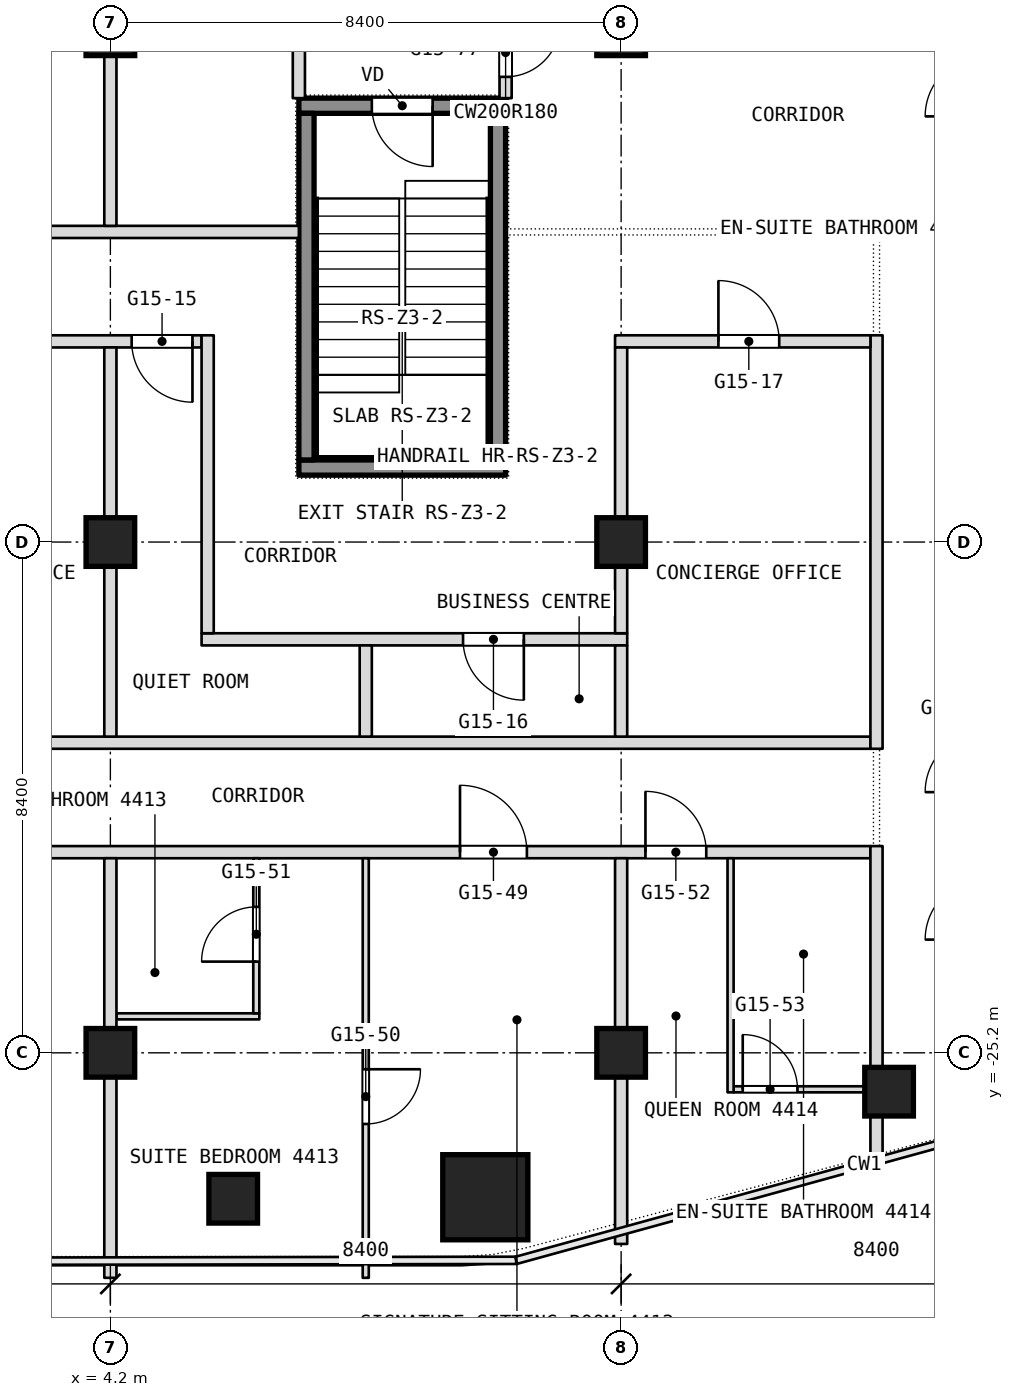
"""IFC4 building model, lengths in metres.
Left out: names, types, materials, properties, quantities, classifications, styles, units other than length and angle.
Written with IfcOpenShell. Run it as: python <this file> out.ifc"""

import sys

from ifc_helpers import new_model, si_unit, direction, frame, frame_2d, origin, origin_2d, place, context, subcontext, project, spatial, rectangle, extrude, element, fill, save


model = new_model("IFC4")
c1 = context("Model", 3, precision=1e-05, world=origin(), true_north=direction((0.0, 1.0)))
c2 = subcontext(c1, "Body", "Model", "MODEL_VIEW")
j1 = project(units=[si_unit("LENGTHUNIT", "METRE"), si_unit("PLANEANGLEUNIT", "RADIAN")], contexts=[c1])
p1 = place(None, origin())
s1 = spatial("IfcSite", under=j1, at=p1, CompositionType="ELEMENT")
p2 = place(p1, origin())
s2 = spatial("IfcBuilding", under=s1, at=p2, CompositionType="ELEMENT")
p3 = place(p2, frame((0.0, 0.0, 194.9)))
s3 = spatial("IfcBuildingStorey", under=s2, at=p3, CompositionType="ELEMENT", Elevation=194.9)
p4 = place(p3, frame((10.366, -27.575, 0.0), z_axis=(0.0, 0.0, 1.0), x_axis=(1.0, 0.0, 0.0)))
e1 = element("IfcColumn", 1, at=p4, inside=s3, PredefinedType="COLUMN", context=c2, shape_type="SweptSolid", body=[
    extrude(rectangle(XDim=1.4, YDim=1.4, at=origin_2d()), origin(), (0.0, 0.0, 1.0), 3.6),
])
for number, where, z_axis, x_axis in (
    (2, (4.2, -25.2, 0.0), (0.0, 0.0, 1.0), (1.0, 0.0, 0.0)),
    (3, (4.2, -16.8, 0.0), (0.0, 0.0, 1.0), (1.0, 0.0, 0.0)),
    (4, (4.2, -8.4, 0.0), (0.0, 0.0, 1.0), (1.0, 0.0, 0.0)),
    (5, (12.6, -25.2, 0.0), (0.0, 0.0, 1.0), (1.0, 0.0, 0.0)),
    (6, (12.6, -16.8, 0.0), (0.0, 0.0, 1.0), (1.0, 0.0, 0.0)),
    (7, (12.6, -8.4, 0.0), (0.0, 0.0, 1.0), (1.0, 0.0, 0.0)),
    (8, (17.007, -25.839, 0.0), (0.0, 0.0, 1.0), (1.0, 0.0, 0.0)),
    (9, (6.22, -27.6, 0.0), (0.0, 0.0, 1.0), (1.0, 0.0, 0.0)),
):
    element("IfcColumn", number, at=place(p3, frame(where, z_axis=z_axis, x_axis=x_axis)), inside=s3, PredefinedType="COLUMN", context=c2, shape_type="SweptSolid", body=[
        extrude(rectangle(XDim=0.8, YDim=0.8, at=origin_2d()), origin(), (0.0, 0.0, 1.0), 3.6),
    ])
p5 = place(p3, frame((14.45, -25.8, 0.0), z_axis=(0.0, 0.0, 1.0), x_axis=(1.0, 0.0, 0.0)))
e10 = element("IfcWall", 10, at=p5, inside=s3, PredefinedType="PARTITIONING", context=c2, shape_type="SweptSolid", body=[
    extrude(rectangle(XDim=2.25, YDim=0.1, at=frame_2d((1.125, 0.0))), origin(), (0.0, 0.0, 1.0), 3.34),
])
p6 = place(p5, frame((0.15, 0.0, 0.0)))
e11 = element("IfcOpeningElement", 11, at=p6, cuts=e10, PredefinedType="OPENING", context=c2, shape_type="SweptSolid", body=[
    extrude(rectangle(XDim=0.9, YDim=2.1, at=frame_2d((0.45, 1.05))), frame((0.0, 0.05, 0.0), z_axis=(0.0, -1.0, 0.0), x_axis=(1.0, 0.0, 0.0)), (0.0, 0.0, 1.0), 0.1),
])
p7 = place(p3, frame((4.3, -24.6, 0.0), z_axis=(0.0, 0.0, 1.0), x_axis=(1.0, 0.0, 0.0)))
e12 = element("IfcWall", 12, at=p7, inside=s3, PredefinedType="PARTITIONING", context=c2, shape_type="SweptSolid", body=[
    extrude(rectangle(XDim=2.35, YDim=0.1, at=frame_2d((1.175, 0.0))), origin(), (0.0, 0.0, 1.0), 3.34),
])
p8 = place(p3, frame((-16.7, -21.9, 0.0), z_axis=(0.0, 0.0, 1.0), x_axis=(1.0, 0.0, 0.0)))
e13 = element("IfcWall", 13, at=p8, inside=s3, PredefinedType="PARTITIONING", context=c2, shape_type="SweptSolid", body=[
    extrude(rectangle(XDim=33.4, YDim=0.2, at=frame_2d((16.7, 0.0))), origin(), (0.0, 0.0, 1.0), 3.34),
])
p9 = place(p8, frame((0.3, 0.0, 0.0)))
e14 = element("IfcOpeningElement", 14, at=p9, cuts=e13, PredefinedType="OPENING", context=c2, shape_type="SweptSolid", body=[
    extrude(rectangle(XDim=1.0, YDim=2.1, at=frame_2d((0.5, 1.05))), frame((0.0, 0.1, 0.0), z_axis=(0.0, -1.0, 0.0), x_axis=(1.0, 0.0, 0.0)), (0.0, 0.0, 1.0), 0.2),
])
p10 = place(p8, frame((6.9, 0.0, 0.0)))
e15 = element("IfcOpeningElement", 15, at=p10, cuts=e13, PredefinedType="OPENING", context=c2, shape_type="SweptSolid", body=[
    extrude(rectangle(XDim=1.0, YDim=2.1, at=frame_2d((0.5, 1.05))), frame((0.0, 0.1, 0.0), z_axis=(0.0, -1.0, 0.0), x_axis=(1.0, 0.0, 0.0)), (0.0, 0.0, 1.0), 0.2),
])
p11 = place(p8, frame((8.7, 0.0, 0.0)))
e16 = element("IfcOpeningElement", 16, at=p11, cuts=e13, PredefinedType="OPENING", context=c2, shape_type="SweptSolid", body=[
    extrude(rectangle(XDim=1.0, YDim=2.1, at=frame_2d((0.5, 1.05))), frame((0.0, 0.1, 0.0), z_axis=(0.0, -1.0, 0.0), x_axis=(1.0, 0.0, 0.0)), (0.0, 0.0, 1.0), 0.2),
])
p12 = place(p8, frame((15.8, 0.0, 0.0)))
e17 = element("IfcOpeningElement", 17, at=p12, cuts=e13, PredefinedType="OPENING", context=c2, shape_type="SweptSolid", body=[
    extrude(rectangle(XDim=1.8, YDim=2.1, at=frame_2d((0.9, 1.05))), frame((0.0, 0.1, 0.0), z_axis=(0.0, -1.0, 0.0), x_axis=(1.0, 0.0, 0.0)), (0.0, 0.0, 1.0), 0.2),
])
p13 = place(p8, frame((26.65, 0.0, 0.0)))
e18 = element("IfcOpeningElement", 18, at=p13, cuts=e13, PredefinedType="OPENING", context=c2, shape_type="SweptSolid", body=[
    extrude(rectangle(XDim=1.1, YDim=2.1, at=frame_2d((0.55, 1.05))), frame((0.0, 0.1, 0.0), z_axis=(0.0, -1.0, 0.0), x_axis=(1.0, 0.0, 0.0)), (0.0, 0.0, 1.0), 0.2),
])
p14 = place(p8, frame((29.7, 0.0, 0.0)))
e19 = element("IfcOpeningElement", 19, at=p14, cuts=e13, PredefinedType="OPENING", context=c2, shape_type="SweptSolid", body=[
    extrude(rectangle(XDim=1.0, YDim=2.1, at=frame_2d((0.5, 1.05))), frame((0.0, 0.1, 0.0), z_axis=(0.0, -1.0, 0.0), x_axis=(1.0, 0.0, 0.0)), (0.0, 0.0, 1.0), 0.2),
])
p15 = place(p3, frame((-16.7, -20.1, 0.0), z_axis=(0.0, 0.0, 1.0), x_axis=(1.0, 0.0, 0.0)))
e20 = element("IfcWall", 20, at=p15, inside=s3, PredefinedType="PARTITIONING", context=c2, shape_type="SweptSolid", body=[
    extrude(rectangle(XDim=33.4, YDim=0.2, at=frame_2d((16.7, 0.0))), origin(), (0.0, 0.0, 1.0), 3.34),
])
p16 = place(p3, frame((5.7, -18.4, 0.0), z_axis=(0.0, 0.0, 1.0), x_axis=(1.0, 0.0, 0.0)))
e21 = element("IfcWall", 21, at=p16, inside=s3, PredefinedType="PARTITIONING", context=c2, shape_type="SweptSolid", body=[
    extrude(rectangle(XDim=7.0, YDim=0.2, at=frame_2d((3.5, 0.0))), origin(), (0.0, 0.0, 1.0), 3.34),
])
p17 = place(p16, frame((4.3, 0.0, 0.0)))
e22 = element("IfcOpeningElement", 22, at=p17, cuts=e21, PredefinedType="OPENING", context=c2, shape_type="SweptSolid", body=[
    extrude(rectangle(XDim=1.0, YDim=2.1, at=frame_2d((0.5, 1.05))), frame((0.0, 0.1, 0.0), z_axis=(0.0, -1.0, 0.0), x_axis=(1.0, 0.0, 0.0)), (0.0, 0.0, 1.0), 0.2),
])
p18 = place(p3, frame((16.8, -27.229, 0.0), z_axis=(0.0, 0.0, 1.0), x_axis=(0.0, 1.0, 0.0)))
e23 = element("IfcWall", 23, at=p18, inside=s3, PredefinedType="PARTITIONING", context=c2, shape_type="SweptSolid", body=[
    extrude(rectangle(XDim=5.429, YDim=0.2, at=frame_2d((2.714, 0.0))), origin(), (0.0, 0.0, 1.0), 3.34),
])
p19 = place(p3, frame((16.8, -20.2, 0.0), z_axis=(0.0, 0.0, 1.0), x_axis=(0.0, 1.0, 0.0)))
e24 = element("IfcWall", 24, at=p19, inside=s3, PredefinedType="PARTITIONING", context=c2, shape_type="SweptSolid", body=[
    extrude(rectangle(XDim=6.8, YDim=0.2, at=frame_2d((3.4, 0.0))), origin(), (0.0, 0.0, 1.0), 3.34),
])
p20 = place(p3, frame((14.4, -25.85, 0.0), z_axis=(0.0, 0.0, 1.0), x_axis=(0.0, 1.0, 0.0)))
e25 = element("IfcWall", 25, at=p20, inside=s3, PredefinedType="PARTITIONING", context=c2, shape_type="SweptSolid", body=[
    extrude(rectangle(XDim=3.85, YDim=0.1, at=frame_2d((1.925, 0.0))), origin(), (0.0, 0.0, 1.0), 3.34),
])
p21 = place(p3, frame((-5.9, -13.5, 0.0), z_axis=(0.0, 0.0, 1.0), x_axis=(1.0, 0.0, 0.0)))
e26 = element("IfcWall", 26, at=p21, inside=s3, PredefinedType="PARTITIONING", context=c2, shape_type="SweptSolid", body=[
    extrude(rectangle(XDim=11.6, YDim=0.2, at=frame_2d((5.8, 0.0))), origin(), (0.0, 0.0, 1.0), 3.34),
])
p22 = place(p21, frame((3.3, 0.0, 0.0)))
e27 = element("IfcOpeningElement", 27, at=p22, cuts=e26, PredefinedType="OPENING", context=c2, shape_type="SweptSolid", body=[
    extrude(rectangle(XDim=1.0, YDim=2.1, at=frame_2d((0.5, 1.05))), frame((0.0, 0.1, 0.0), z_axis=(0.0, -1.0, 0.0), x_axis=(1.0, 0.0, 0.0)), (0.0, 0.0, 1.0), 0.2),
])
p23 = place(p21, frame((7.5, 0.0, 0.0)))
e28 = element("IfcOpeningElement", 28, at=p23, cuts=e26, PredefinedType="OPENING", context=c2, shape_type="SweptSolid", body=[
    extrude(rectangle(XDim=1.0, YDim=2.1, at=frame_2d((0.5, 1.05))), frame((0.0, 0.1, 0.0), z_axis=(0.0, -1.0, 0.0), x_axis=(1.0, 0.0, 0.0)), (0.0, 0.0, 1.0), 0.2),
])
p24 = place(p21, frame((10.45, 0.0, 0.0)))
e29 = element("IfcOpeningElement", 29, at=p24, cuts=e26, PredefinedType="OPENING", context=c2, shape_type="SweptSolid", body=[
    extrude(rectangle(XDim=1.0, YDim=2.1, at=frame_2d((0.5, 1.05))), frame((0.0, 0.1, 0.0), z_axis=(0.0, -1.0, 0.0), x_axis=(1.0, 0.0, 0.0)), (0.0, 0.0, 1.0), 0.2),
])
p25 = place(p3, frame((12.5, -13.5, 0.0), z_axis=(0.0, 0.0, 1.0), x_axis=(1.0, 0.0, 0.0)))
e30 = element("IfcWall", 30, at=p25, inside=s3, PredefinedType="PARTITIONING", context=c2, shape_type="SweptSolid", body=[
    extrude(rectangle(XDim=4.2, YDim=0.2, at=frame_2d((2.1, 0.0))), origin(), (0.0, 0.0, 1.0), 3.34),
])
p26 = place(p25, frame((1.7, 0.0, 0.0)))
e31 = element("IfcOpeningElement", 31, at=p26, cuts=e30, PredefinedType="OPENING", context=c2, shape_type="SweptSolid", body=[
    extrude(rectangle(XDim=1.0, YDim=2.1, at=frame_2d((0.5, 1.05))), frame((0.0, 0.1, 0.0), z_axis=(0.0, -1.0, 0.0), x_axis=(1.0, 0.0, 0.0)), (0.0, 0.0, 1.0), 0.2),
])
p27 = place(p3, frame((12.6, -28.343, 0.0), z_axis=(0.0, 0.0, 1.0), x_axis=(0.0, 1.0, 0.0)))
e32 = element("IfcWall", 32, at=p27, inside=s3, PredefinedType="PARTITIONING", context=c2, shape_type="SweptSolid", body=[
    extrude(rectangle(XDim=6.343, YDim=0.2, at=frame_2d((3.171, 0.0))), origin(), (0.0, 0.0, 1.0), 3.34),
])
p28 = place(p3, frame((12.6, -20.0, 0.0), z_axis=(0.0, 0.0, 1.0), x_axis=(0.0, 1.0, 0.0)))
e33 = element("IfcWall", 33, at=p28, inside=s3, PredefinedType="PARTITIONING", context=c2, shape_type="SweptSolid", body=[
    extrude(rectangle(XDim=1.5, YDim=0.2, at=frame_2d((0.75, 0.0))), origin(), (0.0, 0.0, 1.0), 3.34),
])
p29 = place(p3, frame((12.6, -18.3, 0.0), z_axis=(0.0, 0.0, 1.0), x_axis=(0.0, 1.0, 0.0)))
e34 = element("IfcWall", 34, at=p29, inside=s3, PredefinedType="PARTITIONING", context=c2, shape_type="SweptSolid", body=[
    extrude(rectangle(XDim=4.7, YDim=0.2, at=frame_2d((2.35, 0.0))), origin(), (0.0, 0.0, 1.0), 3.34),
])
p30 = place(p3, frame((-7.3, -11.7, 0.0), z_axis=(0.0, 0.0, 1.0), x_axis=(1.0, 0.0, 0.0)))
e35 = element("IfcWall", 35, at=p30, inside=s3, PredefinedType="PARTITIONING", context=c2, shape_type="SweptSolid", body=[
    extrude(rectangle(XDim=14.6, YDim=0.2, at=frame_2d((7.3, 0.0))), origin(), (0.0, 0.0, 1.0), 3.34),
])
p31 = place(p3, frame((10.7, -9.5, 0.0), z_axis=(0.0, 0.0, 1.0), x_axis=(0.0, 1.0, 0.0)))
e36 = element("IfcWall", 36, at=p31, inside=s3, PredefinedType="PARTITIONING", context=c2, shape_type="SweptSolid", body=[
    extrude(rectangle(XDim=1.5, YDim=0.2, at=frame_2d((0.75, 0.0))), origin(), (0.0, 0.0, 1.0), 3.34),
])
p32 = place(p31, frame((0.35, 0.0, 0.0)))
e37 = element("IfcOpeningElement", 37, at=p32, cuts=e36, PredefinedType="OPENING", context=c2, shape_type="SweptSolid", body=[
    extrude(rectangle(XDim=0.9, YDim=2.1, at=frame_2d((0.45, 1.05))), frame((0.0, 0.1, 0.0), z_axis=(0.0, -1.0, 0.0), x_axis=(1.0, 0.0, 0.0)), (0.0, 0.0, 1.0), 0.2),
])
p33 = place(p3, frame((8.4, -28.9, 0.0), z_axis=(0.0, 0.0, 1.0), x_axis=(0.0, 1.0, 0.0)))
e38 = element("IfcWall", 38, at=p33, inside=s3, PredefinedType="PARTITIONING", context=c2, shape_type="SweptSolid", body=[
    extrude(rectangle(XDim=6.9, YDim=0.1, at=frame_2d((3.45, 0.0))), origin(), (0.0, 0.0, 1.0), 3.34),
])
p34 = place(p33, frame((2.53, 0.0, 0.0)))
e39 = element("IfcOpeningElement", 39, at=p34, cuts=e38, PredefinedType="OPENING", context=c2, shape_type="SweptSolid", body=[
    extrude(rectangle(XDim=0.9, YDim=2.1, at=frame_2d((0.45, 1.05))), frame((0.0, 0.05, 0.0), z_axis=(0.0, -1.0, 0.0), x_axis=(1.0, 0.0, 0.0)), (0.0, 0.0, 1.0), 0.1),
])
for number, where, z_axis, x_axis in (
    (40, (8.4, -20.0, 0.0), (0.0, 0.0, 1.0), (0.0, 1.0, 0.0)),
    (41, (7.3, -9.5, 0.0), (0.0, 0.0, 1.0), (0.0, 1.0, 0.0)),
):
    element("IfcWall", number, at=place(p3, frame(where, z_axis=z_axis, x_axis=x_axis)), inside=s3, PredefinedType="PARTITIONING", context=c2, shape_type="SweptSolid", body=[
        extrude(rectangle(XDim=1.5, YDim=0.2, at=frame_2d((0.75, 0.0))), origin(), (0.0, 0.0, 1.0), 3.34),
    ])
p35 = place(p3, frame((6.6, -24.55, 0.0), z_axis=(0.0, 0.0, 1.0), x_axis=(0.0, 1.0, 0.0)))
e42 = element("IfcWall", 42, at=p35, inside=s3, PredefinedType="PARTITIONING", context=c2, shape_type="SweptSolid", body=[
    extrude(rectangle(XDim=2.55, YDim=0.1, at=frame_2d((1.275, 0.0))), origin(), (0.0, 0.0, 1.0), 3.34),
])
p36 = place(p35, frame((0.85, 0.0, 0.0)))
e43 = element("IfcOpeningElement", 43, at=p36, cuts=e42, PredefinedType="OPENING", context=c2, shape_type="SweptSolid", body=[
    extrude(rectangle(XDim=0.9, YDim=2.1, at=frame_2d((0.45, 1.05))), frame((0.0, 0.05, 0.0), z_axis=(0.0, -1.0, 0.0), x_axis=(1.0, 0.0, 0.0)), (0.0, 0.0, 1.0), 0.1),
])
p37 = place(p3, frame((5.8, -18.3, 0.0), z_axis=(0.0, 0.0, 1.0), x_axis=(0.0, 1.0, 0.0)))
e44 = element("IfcWall", 44, at=p37, inside=s3, PredefinedType="PARTITIONING", context=c2, shape_type="SweptSolid", body=[
    extrude(rectangle(XDim=4.9, YDim=0.2, at=frame_2d((2.45, 0.0))), origin(), (0.0, 0.0, 1.0), 3.34),
])
p38 = place(p3, frame((4.2, -28.9, 0.0), z_axis=(0.0, 0.0, 1.0), x_axis=(0.0, 1.0, 0.0)))
e45 = element("IfcWall", 45, at=p38, inside=s3, PredefinedType="PARTITIONING", context=c2, shape_type="SweptSolid", body=[
    extrude(rectangle(XDim=6.9, YDim=0.2, at=frame_2d((3.45, 0.0))), origin(), (0.0, 0.0, 1.0), 3.34),
])
p39 = place(p3, frame((4.2, -20.0, 0.0), z_axis=(0.0, 0.0, 1.0), x_axis=(0.0, 1.0, 0.0)))
e46 = element("IfcWall", 46, at=p39, inside=s3, PredefinedType="PARTITIONING", context=c2, shape_type="SweptSolid", body=[
    extrude(rectangle(XDim=6.4, YDim=0.2, at=frame_2d((3.2, 0.0))), origin(), (0.0, 0.0, 1.0), 3.34),
])
p40 = place(p3, frame((4.2, -11.6, 0.0), z_axis=(0.0, 0.0, 1.0), x_axis=(0.0, 1.0, 0.0)))
e47 = element("IfcWall", 47, at=p40, inside=s3, PredefinedType="PARTITIONING", context=c2, shape_type="SweptSolid", body=[
    extrude(rectangle(XDim=9.7, YDim=0.2, at=frame_2d((4.85, 0.0))), origin(), (0.0, 0.0, 1.0), 3.34),
])
p41 = place(p3, frame((7.3, -15.575, 0.1), z_axis=(0.0, 0.0, 1.0), x_axis=(1.0, 0.0, 0.0)))
e48 = element("IfcWall", 48, at=p41, inside=s3, PredefinedType="SHEAR", context=c2, shape_type="SweptSolid", body=[
    extrude(rectangle(XDim=3.4, YDim=0.25, at=frame_2d((1.7, 0.0))), origin(), (0.0, 0.0, 1.0), 3.6),
])
p42 = place(p3, frame((7.3, -9.625, 0.1), z_axis=(0.0, 0.0, 1.0), x_axis=(1.0, 0.0, 0.0)))
e49 = element("IfcWall", 49, at=p42, inside=s3, PredefinedType="SHEAR", context=c2, shape_type="SweptSolid", body=[
    extrude(rectangle(XDim=3.4, YDim=0.25, at=frame_2d((1.7, 0.0))), origin(), (0.0, 0.0, 1.0), 3.6),
])
p43 = place(p42, frame((1.2, 0.0, 0.0)))
e50 = element("IfcOpeningElement", 50, at=p43, cuts=e49, PredefinedType="OPENING", context=c2, shape_type="SweptSolid", body=[
    extrude(rectangle(XDim=1.0, YDim=2.1, at=frame_2d((0.5, 1.05))), frame((0.0, 0.125, 0.0), z_axis=(0.0, -1.0, 0.0), x_axis=(1.0, 0.0, 0.0)), (0.0, 0.0, 1.0), 0.25),
])
for number, where, z_axis, x_axis in (
    (51, (7.425, -15.45, 0.1), (0.0, 0.0, 1.0), (0.0, 1.0, 0.0)),
    (52, (10.575, -15.45, 0.1), (0.0, 0.0, 1.0), (0.0, 1.0, 0.0)),
):
    element("IfcWall", number, at=place(p3, frame(where, z_axis=z_axis, x_axis=x_axis)), inside=s3, PredefinedType="SHEAR", context=c2, shape_type="SweptSolid", body=[
        extrude(rectangle(XDim=5.7, YDim=0.25, at=frame_2d((2.85, 0.0))), origin(), (0.0, 0.0, 1.0), 3.6),
    ])
p44 = place(p6, origin())
e53 = element("IfcDoor", 53, at=p44, inside=s3, OperationType="SINGLE_SWING_LEFT", PredefinedType="DOOR", context=c2, shape_type="SweptSolid", body=[
    extrude(rectangle(XDim=0.9, YDim=2.1, at=frame_2d((0.45, 1.05))), frame((0.0, 0.025, 0.0), z_axis=(0.0, -1.0, 0.0), x_axis=(1.0, 0.0, 0.0)), (0.0, 0.0, 1.0), 0.05),
])
fill(e11, e53)
p45 = place(p13, origin())
e54 = element("IfcDoor", 54, at=p45, inside=s3, OperationType="SINGLE_SWING_LEFT", PredefinedType="DOOR", context=c2, shape_type="SweptSolid", body=[
    extrude(rectangle(XDim=1.1, YDim=2.1, at=frame_2d((0.55, 1.05))), frame((0.0, 0.025, 0.0), z_axis=(0.0, -1.0, 0.0), x_axis=(1.0, 0.0, 0.0)), (0.0, 0.0, 1.0), 0.05),
])
fill(e18, e54)
p46 = place(p14, origin())
e55 = element("IfcDoor", 55, at=p46, inside=s3, OperationType="SINGLE_SWING_RIGHT", PredefinedType="DOOR", context=c2, shape_type="SweptSolid", body=[
    extrude(rectangle(XDim=1.0, YDim=2.1, at=frame_2d((0.5, 1.05))), frame((0.0, 0.025, 0.0), z_axis=(0.0, -1.0, 0.0), x_axis=(1.0, 0.0, 0.0)), (0.0, 0.0, 1.0), 0.05),
])
fill(e19, e55)
p47 = place(p17, origin())
e56 = element("IfcDoor", 56, at=p47, inside=s3, OperationType="SINGLE_SWING_LEFT", PredefinedType="DOOR", context=c2, shape_type="SweptSolid", body=[
    extrude(rectangle(XDim=1.0, YDim=2.1, at=frame_2d((0.5, 1.05))), frame((0.0, 0.025, 0.0), z_axis=(0.0, -1.0, 0.0), x_axis=(1.0, 0.0, 0.0)), (0.0, 0.0, 1.0), 0.05),
])
fill(e22, e56)
p48 = place(p24, origin())
e57 = element("IfcDoor", 57, at=p48, inside=s3, OperationType="SINGLE_SWING_LEFT", PredefinedType="DOOR", context=c2, shape_type="SweptSolid", body=[
    extrude(rectangle(XDim=1.0, YDim=2.1, at=frame_2d((0.5, 1.05))), frame((0.0, 0.025, 0.0), z_axis=(0.0, -1.0, 0.0), x_axis=(1.0, 0.0, 0.0)), (0.0, 0.0, 1.0), 0.05),
])
fill(e29, e57)
p49 = place(p26, origin())
e58 = element("IfcDoor", 58, at=p49, inside=s3, OperationType="SINGLE_SWING_LEFT", PredefinedType="DOOR", context=c2, shape_type="SweptSolid", body=[
    extrude(rectangle(XDim=1.0, YDim=2.1, at=frame_2d((0.5, 1.05))), frame((0.0, 0.025, 0.0), z_axis=(0.0, -1.0, 0.0), x_axis=(1.0, 0.0, 0.0)), (0.0, 0.0, 1.0), 0.05),
])
fill(e31, e58)
p50 = place(p32, origin())
e59 = element("IfcDoor", 59, at=p50, inside=s3, OperationType="SINGLE_SWING_RIGHT", PredefinedType="DOOR", context=c2, shape_type="SweptSolid", body=[
    extrude(rectangle(XDim=0.9, YDim=2.1, at=frame_2d((0.45, 1.05))), frame((0.0, 0.025, 0.0), z_axis=(0.0, -1.0, 0.0), x_axis=(1.0, 0.0, 0.0)), (0.0, 0.0, 1.0), 0.05),
])
fill(e37, e59)
p51 = place(p34, origin())
e60 = element("IfcDoor", 60, at=p51, inside=s3, OperationType="SINGLE_SWING_LEFT", PredefinedType="DOOR", context=c2, shape_type="SweptSolid", body=[
    extrude(rectangle(XDim=0.9, YDim=2.1, at=frame_2d((0.45, 1.05))), frame((0.0, 0.025, 0.0), z_axis=(0.0, -1.0, 0.0), x_axis=(1.0, 0.0, 0.0)), (0.0, 0.0, 1.0), 0.05),
])
fill(e39, e60)
p52 = place(p36, origin())
e61 = element("IfcDoor", 61, at=p52, inside=s3, OperationType="SINGLE_SWING_RIGHT", PredefinedType="DOOR", context=c2, shape_type="SweptSolid", body=[
    extrude(rectangle(XDim=0.9, YDim=2.1, at=frame_2d((0.45, 1.05))), frame((0.0, 0.025, 0.0), z_axis=(0.0, -1.0, 0.0), x_axis=(1.0, 0.0, 0.0)), (0.0, 0.0, 1.0), 0.05),
])
fill(e43, e61)
p53 = place(p43, origin())
e62 = element("IfcDoor", 62, at=p53, inside=s3, OperationType="SINGLE_SWING_LEFT", PredefinedType="DOOR", context=c2, shape_type="SweptSolid", body=[
    extrude(rectangle(XDim=1.0, YDim=2.1, at=frame_2d((0.5, 1.05))), frame((0.0, 0.025, 0.0), z_axis=(0.0, -1.0, 0.0), x_axis=(1.0, 0.0, 0.0)), (0.0, 0.0, 1.0), 0.05),
])
fill(e50, e62)
save(model, sys.argv[1])
